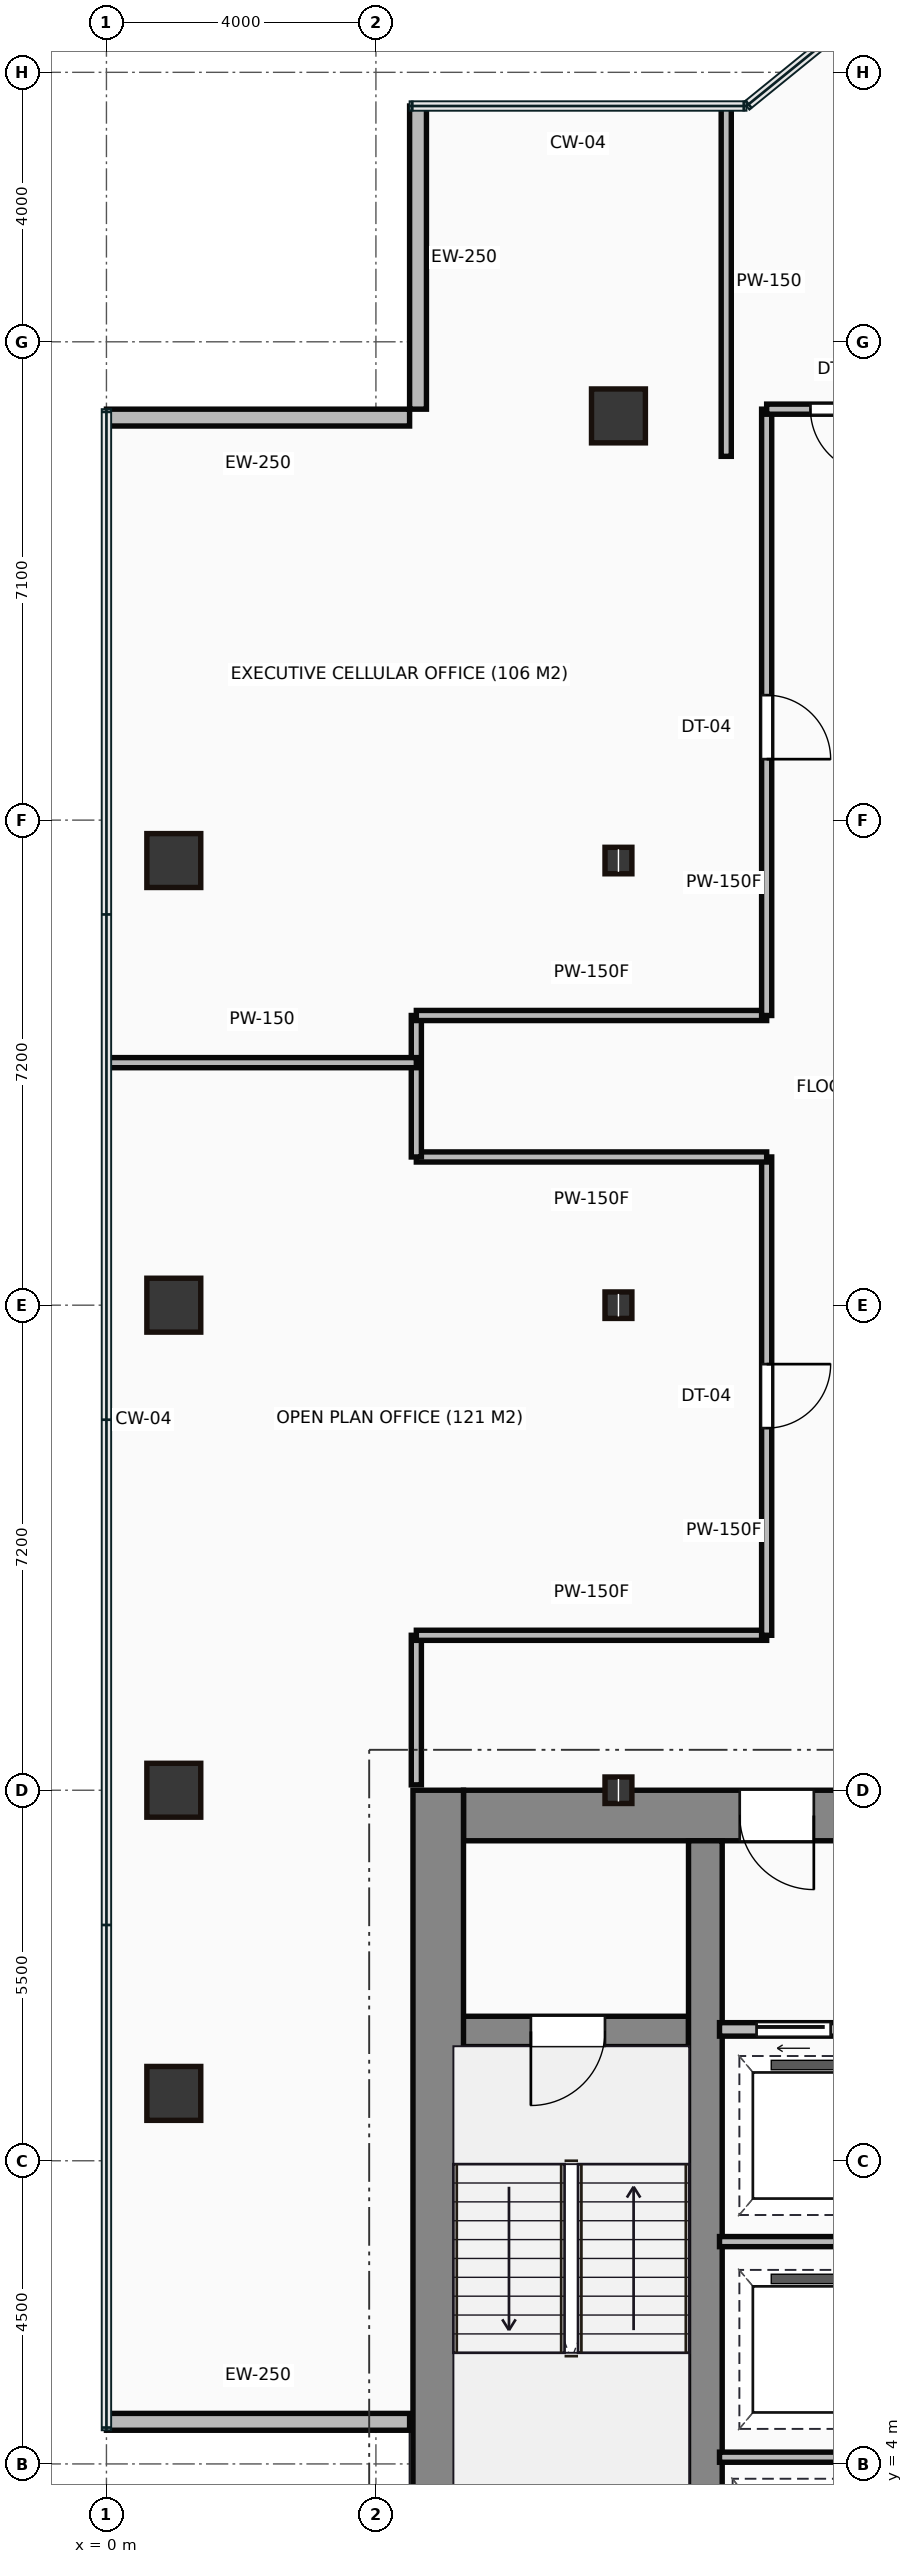
"""IFC4 building model, lengths in metres.
Left out: names, types, materials, properties, quantities, classifications, styles, units other than length and angle.
Written with IfcOpenShell. Run it as: python <this file> out.ifc"""

import sys

from ifc_helpers import new_model, si_unit, direction, frame, frame_2d, origin, origin_2d, place, context, subcontext, project, spatial, rectangle, hollow_rectangle, i_section, extrude, source, transform, mapped, element, fill, save


model = new_model("IFC4")
c1 = context("Model", 3, precision=1e-05, world=origin(), true_north=direction((0.0, 1.0)))
c2 = subcontext(c1, "Body", "Model", "MODEL_VIEW")
j1 = project(units=[si_unit("LENGTHUNIT", "METRE"), si_unit("PLANEANGLEUNIT", "RADIAN")], contexts=[c1])
p1 = place(None, origin())
s1 = spatial("IfcSite", under=j1, at=p1, CompositionType="ELEMENT")
p2 = place(p1, origin())
s2 = spatial("IfcBuilding", under=s1, at=p2, CompositionType="ELEMENT")
p3 = place(p2, frame((0.0, 0.0, 106.9)))
s3 = spatial("IfcBuildingStorey", under=s2, at=p3, CompositionType="ELEMENT", Elevation=106.9)
m1 = source(origin(), c2, "Body", "SweptSolid", [
    extrude(rectangle(XDim=13.1, YDim=0.75, at=frame_2d((6.55, 0.0))), origin(), (0.0, 0.0, 1.0), 3.65),
])
p4 = place(p3, frame((4.925, 0.9, 0.0), z_axis=(0.0, 0.0, 1.0), x_axis=(0.0, 1.0, 0.0)))
e1 = element("IfcWall", 1, at=p4, inside=s3, PredefinedType="SHEAR", context=c2, shape_type="MappedRepresentation", body=[
    mapped(m1, transform((0.0, 0.0, 0.0))),
])
m2 = source(origin(), c2, "Body", "SweptSolid", [
    extrude(rectangle(XDim=9.1, YDim=0.75, at=frame_2d((4.55, 0.0))), origin(), (0.0, 0.0, 1.0), 3.65),
])
p5 = place(p3, frame((5.3, 13.625, 0.0), z_axis=(0.0, 0.0, 1.0), x_axis=(1.0, 0.0, 0.0)))
e2 = element("IfcWall", 2, at=p5, inside=s3, PredefinedType="SHEAR", context=c2, shape_type="MappedRepresentation", body=[
    mapped(m2, transform((0.0, 0.0, 0.0))),
])
p6 = place(p5, frame((4.1, 0.0, 0.0)))
e3 = element("IfcOpeningElement", 3, at=p6, cuts=e2, PredefinedType="OPENING", context=c2, shape_type="SweptSolid", body=[
    extrude(rectangle(XDim=1.1, YDim=2.15, at=frame_2d((0.55, 1.075))), frame((0.0, 0.385, 0.0), z_axis=(0.0, -1.0, 0.0), x_axis=(1.0, 0.0, 0.0)), (0.0, 0.0, 1.0), 0.77),
])
m3 = source(origin(), c2, "Body", "SweptSolid", [
    extrude(rectangle(XDim=12.35, YDim=0.5, at=frame_2d((6.175, 0.0))), origin(), (0.0, 0.0, 1.0), 3.65),
])
p7 = place(p3, frame((8.89, 0.9, 0.0), z_axis=(0.0, 0.0, 1.0), x_axis=(0.0, 1.0, 0.0)))
e4 = element("IfcWall", 4, at=p7, inside=s3, PredefinedType="SHEAR", context=c2, shape_type="MappedRepresentation", body=[
    mapped(m3, transform((0.0, 0.0, 0.0))),
])
m4 = source(origin(), c2, "Body", "SweptSolid", [
    extrude(rectangle(XDim=3.39, YDim=0.45, at=frame_2d((1.695, 0.0))), origin(), (0.0, 0.0, 1.0), 3.65),
])
p8 = place(p3, frame((5.25, 10.42, 0.0), z_axis=(0.0, 0.0, 1.0), x_axis=(1.0, 0.0, 0.0)))
e5 = element("IfcWall", 5, at=p8, inside=s3, PredefinedType="SHEAR", context=c2, shape_type="MappedRepresentation", body=[
    mapped(m4, transform((0.0, 0.0, 0.0))),
])
p9 = place(p8, frame((1.05, 0.0, 0.0)))
e6 = element("IfcOpeningElement", 6, at=p9, cuts=e5, PredefinedType="OPENING", context=c2, shape_type="SweptSolid", body=[
    extrude(rectangle(XDim=1.1, YDim=2.15, at=frame_2d((0.55, 1.075))), frame((0.0, 0.235, 0.0), z_axis=(0.0, -1.0, 0.0), x_axis=(1.0, 0.0, 0.0)), (0.0, 0.0, 1.0), 0.47),
])
m5 = source(origin(), c2, "Body", "SweptSolid", [
    extrude(hollow_rectangle(XDim=0.8, YDim=0.8, WallThickness=0.04, at=origin_2d()), origin(), (0.0, 0.0, 1.0), 3.65),
])
for number, where, z_axis, x_axis in (
    (7, (1.0, 9.5, 0.0), (0.0, 0.0, 1.0), (1.0, 0.0, 0.0)),
    (8, (1.0, 14.0, 0.0), (0.0, 0.0, 1.0), (1.0, 0.0, 0.0)),
    (9, (1.0, 21.2, 0.0), (0.0, 0.0, 1.0), (1.0, 0.0, 0.0)),
    (10, (1.0, 27.8, 0.0), (0.0, 0.0, 1.0), (1.0, 0.0, 0.0)),
):
    element("IfcColumn", number, at=place(p3, frame(where, z_axis=z_axis, x_axis=x_axis)), inside=s3, PredefinedType="COLUMN", context=c2, shape_type="MappedRepresentation", body=[
        mapped(m5, transform((0.0, 0.0, 0.0))),
    ])
m6 = source(origin(), c2, "Body", "SweptSolid", [
    extrude(i_section(OverallWidth=0.399, OverallDepth=0.393, WebThickness=0.023, FlangeThickness=0.037, at=origin_2d()), origin(), (0.0, 0.0, 1.0), 3.65),
])
for number, where, z_axis, x_axis in (
    (11, (7.6, 14.0, 0.0), (0.0, 0.0, 1.0), (1.0, 0.0, 0.0)),
    (12, (7.6, 21.2, 0.0), (0.0, 0.0, 1.0), (1.0, 0.0, 0.0)),
    (13, (7.6, 27.8, 0.0), (0.0, 0.0, 1.0), (1.0, 0.0, 0.0)),
):
    element("IfcColumn", number, at=place(p3, frame(where, z_axis=z_axis, x_axis=x_axis)), inside=s3, PredefinedType="COLUMN", context=c2, shape_type="MappedRepresentation", body=[
        mapped(m6, transform((0.0, 0.0, 0.0))),
    ])
p10 = place(p3, frame((7.6, 34.4, 0.0), z_axis=(0.0, 0.0, 1.0), x_axis=(1.0, 0.0, 0.0)))
e14 = element("IfcColumn", 14, at=p10, inside=s3, PredefinedType="COLUMN", context=c2, shape_type="MappedRepresentation", body=[
    mapped(m5, transform((0.0, 0.0, 0.0))),
])
m7 = source(origin(), c2, "Body", "SweptSolid", [
    extrude(rectangle(XDim=4.5, YDim=0.25, at=frame_2d((2.25, 0.0))), origin(), (0.0, 0.0, 1.0), 3.4),
])
for number, where, z_axis, x_axis in (
    (15, (4.625, 39.0, 0.0), (0.0, 0.0, 1.0), (0.0, -1.0, 0.0)),
    (16, (4.5, 34.375, 0.0), (0.0, 0.0, 1.0), (-1.0, 0.0, 0.0)),
    (17, (0.0, 4.625, 0.0), (0.0, 0.0, 1.0), (1.0, 0.0, 0.0)),
):
    element("IfcWall", number, at=place(p3, frame(where, z_axis=z_axis, x_axis=x_axis)), inside=s3, PredefinedType="STANDARD", context=c2, shape_type="MappedRepresentation", body=[
        mapped(m7, transform((0.0, 0.0, 0.0))),
    ])
m8 = source(origin(), c2, "Body", "SweptSolid", [
    extrude(rectangle(XDim=2.35, YDim=0.2, at=frame_2d((1.175, 0.0))), origin(), (0.0, 0.0, 1.0), 3.4),
])
p11 = place(p3, frame((9.1, 10.45, 0.0), z_axis=(0.0, 0.0, 1.0), x_axis=(1.0, 0.0, 0.0)))
e18 = element("IfcWall", 18, at=p11, inside=s3, PredefinedType="PARTITIONING", context=c2, shape_type="MappedRepresentation", body=[
    mapped(m8, transform((0.0, 0.0, 0.0))),
])
p12 = place(p11, frame((0.55, 0.0, 0.0)))
e19 = element("IfcOpeningElement", 19, at=p12, cuts=e18, PredefinedType="OPENING", context=c2, shape_type="SweptSolid", body=[
    extrude(rectangle(XDim=1.1, YDim=2.15, at=frame_2d((0.55, 1.075))), frame((0.0, 0.11, 0.0), z_axis=(0.0, -1.0, 0.0), x_axis=(1.0, 0.0, 0.0)), (0.0, 0.0, 1.0), 0.22),
])
m9 = source(origin(), c2, "Body", "SweptSolid", [
    extrude(rectangle(XDim=2.4, YDim=0.15, at=frame_2d((1.2, 0.0))), origin(), (0.0, 0.0, 1.0), 3.4),
])
for number, where, z_axis, x_axis in (
    (20, (9.1, 4.1, 0.0), (0.0, 0.0, 1.0), (1.0, 0.0, 0.0)),
    (21, (9.1, 7.3, 0.0), (0.0, 0.0, 1.0), (1.0, 0.0, 0.0)),
):
    element("IfcWall", number, at=place(p3, frame(where, z_axis=z_axis, x_axis=x_axis)), inside=s3, PredefinedType="PARTITIONING", context=c2, shape_type="MappedRepresentation", body=[
        mapped(m9, transform((0.0, 0.0, 0.0))),
    ])
m10 = source(origin(), c2, "Body", "SweptSolid", [
    extrude(rectangle(XDim=2.22, YDim=0.15, at=frame_2d((1.11, 0.0))), origin(), (0.0, 0.0, 1.0), 3.4),
])
p13 = place(p3, frame((4.6, 14.08, 0.0), z_axis=(0.0, 0.0, 1.0), x_axis=(0.0, 1.0, 0.0)))
e22 = element("IfcWall", 22, at=p13, inside=s3, PredefinedType="PARTITIONING", context=c2, shape_type="MappedRepresentation", body=[
    mapped(m10, transform((0.0, 0.0, 0.0))),
])
m11 = source(origin(), c2, "Body", "SweptSolid", [
    extrude(rectangle(XDim=5.2, YDim=0.15, at=frame_2d((2.6, 0.0))), origin(), (0.0, 0.0, 1.0), 3.4),
])
p14 = place(p3, frame((4.6, 16.3, 0.0), z_axis=(0.0, 0.0, 1.0), x_axis=(1.0, 0.0, 0.0)))
e23 = element("IfcWall", 23, at=p14, inside=s3, PredefinedType="PARTITIONING", context=c2, shape_type="MappedRepresentation", body=[
    mapped(m11, transform((0.0, 0.0, 0.0))),
])
m12 = source(origin(), c2, "Body", "SweptSolid", [
    extrude(rectangle(XDim=7.1, YDim=0.15, at=frame_2d((3.55, 0.0))), origin(), (0.0, 0.0, 1.0), 3.4),
])
p15 = place(p3, frame((9.8, 16.3, 0.0), z_axis=(0.0, 0.0, 1.0), x_axis=(0.0, 1.0, 0.0)))
e24 = element("IfcWall", 24, at=p15, inside=s3, PredefinedType="PARTITIONING", context=c2, shape_type="MappedRepresentation", body=[
    mapped(m12, transform((0.0, 0.0, 0.0))),
])
p16 = place(p15, frame((3.075, 0.0, 0.0)))
e25 = element("IfcOpeningElement", 25, at=p16, cuts=e24, PredefinedType="OPENING", context=c2, shape_type="SweptSolid", body=[
    extrude(rectangle(XDim=0.95, YDim=2.15, at=frame_2d((0.475, 1.075))), frame((0.0, 0.085, 0.0), z_axis=(0.0, -1.0, 0.0), x_axis=(1.0, 0.0, 0.0)), (0.0, 0.0, 1.0), 0.17),
])
m13 = source(origin(), c2, "Body", "SweptSolid", [
    extrude(rectangle(XDim=5.2, YDim=0.15, at=frame_2d((2.6, 0.0))), origin(), (0.0, 0.0, 1.0), 2.988),
])
p17 = place(p3, frame((9.8, 23.4, 0.0), z_axis=(0.0, 0.0, 1.0), x_axis=(-1.0, 0.0, 0.0)))
e26 = element("IfcWall", 26, at=p17, inside=s3, PredefinedType="PARTITIONING", context=c2, shape_type="MappedRepresentation", body=[
    mapped(m13, transform((0.0, 0.0, 0.0))),
])
m14 = source(origin(), c2, "Body", "SweptSolid", [
    extrude(rectangle(XDim=2.1, YDim=0.15, at=frame_2d((1.05, 0.0))), origin(), (0.0, 0.0, 1.0), 3.4),
])
p18 = place(p3, frame((4.6, 23.4, 0.0), z_axis=(0.0, 0.0, 1.0), x_axis=(0.0, 1.0, 0.0)))
e27 = element("IfcWall", 27, at=p18, inside=s3, PredefinedType="PARTITIONING", context=c2, shape_type="MappedRepresentation", body=[
    mapped(m14, transform((0.0, 0.0, 0.0))),
])
p19 = place(p3, frame((4.6, 25.5, 0.0), z_axis=(0.0, 0.0, 1.0), x_axis=(1.0, 0.0, 0.0)))
e28 = element("IfcWall", 28, at=p19, inside=s3, PredefinedType="PARTITIONING", context=c2, shape_type="MappedRepresentation", body=[
    mapped(m13, transform((0.0, 0.0, 0.0))),
])
m15 = source(origin(), c2, "Body", "SweptSolid", [
    extrude(rectangle(XDim=9.0, YDim=0.15, at=frame_2d((4.5, 0.0))), origin(), (0.0, 0.0, 1.0), 3.4),
])
p20 = place(p3, frame((9.8, 25.5, 0.0), z_axis=(0.0, 0.0, 1.0), x_axis=(0.0, 1.0, 0.0)))
e29 = element("IfcWall", 29, at=p20, inside=s3, PredefinedType="PARTITIONING", context=c2, shape_type="MappedRepresentation", body=[
    mapped(m15, transform((0.0, 0.0, 0.0))),
])
p21 = place(p20, frame((3.805, 0.0, 0.0)))
e30 = element("IfcOpeningElement", 30, at=p21, cuts=e29, PredefinedType="OPENING", context=c2, shape_type="SweptSolid", body=[
    extrude(rectangle(XDim=0.95, YDim=2.15, at=frame_2d((0.475, 1.075))), frame((0.0, 0.085, 0.0), z_axis=(0.0, -1.0, 0.0), x_axis=(1.0, 0.0, 0.0)), (0.0, 0.0, 1.0), 0.17),
])
m16 = source(origin(), c2, "Body", "SweptSolid", [
    extrude(rectangle(XDim=2.25, YDim=0.15, at=frame_2d((1.125, 0.0))), origin(), (0.0, 0.0, 1.0), 2.702),
])
p22 = place(p3, frame((9.8, 34.5, 0.0), z_axis=(0.0, 0.0, 1.0), x_axis=(1.0, 0.0, 0.0)))
e31 = element("IfcWall", 31, at=p22, inside=s3, PredefinedType="PARTITIONING", context=c2, shape_type="MappedRepresentation", body=[
    mapped(m16, transform((0.0, 0.0, 0.0))),
])
p23 = place(p22, frame((0.65, 0.0, 0.0)))
e32 = element("IfcOpeningElement", 32, at=p23, cuts=e31, PredefinedType="OPENING", context=c2, shape_type="SweptSolid", body=[
    extrude(rectangle(XDim=0.95, YDim=2.15, at=frame_2d((0.475, 1.075))), frame((0.0, 0.085, 0.0), z_axis=(0.0, -1.0, 0.0), x_axis=(1.0, 0.0, 0.0)), (0.0, 0.0, 1.0), 0.17),
])
m17 = source(origin(), c2, "Body", "SweptSolid", [
    extrude(rectangle(XDim=4.58, YDim=0.15, at=frame_2d((2.29, 0.0))), origin(), (0.0, 0.0, 1.0), 3.4),
])
p24 = place(p3, frame((0.02, 24.8, 0.0), z_axis=(0.0, 0.0, 1.0), x_axis=(1.0, 0.0, 0.0)))
e33 = element("IfcWall", 33, at=p24, inside=s3, PredefinedType="PARTITIONING", context=c2, shape_type="MappedRepresentation", body=[
    mapped(m17, transform((0.0, 0.0, 0.0))),
])
m18 = source(origin(), c2, "Body", "SweptSolid", [
    extrude(rectangle(XDim=5.18, YDim=0.15, at=frame_2d((2.59, 0.0))), origin(), (0.0, 0.0, 1.0), 3.4),
])
p25 = place(p3, frame((9.2, 38.98, 0.0), z_axis=(0.0, 0.0, 1.0), x_axis=(0.0, -1.0, 0.0)))
e34 = element("IfcWall", 34, at=p25, inside=s3, PredefinedType="PARTITIONING", context=c2, shape_type="MappedRepresentation", body=[
    mapped(m18, transform((0.0, 0.0, 0.0))),
])
m19 = source(origin(), c2, "Body", "SweptSolid", [
    extrude(rectangle(XDim=1.1, YDim=2.15, at=frame_2d((0.55, 1.075))), frame((0.0, 0.025, 0.0), z_axis=(0.0, -1.0, 0.0), x_axis=(1.0, 0.0, 0.0)), (0.0, 0.0, 1.0), 0.05),
])
p26 = place(p9, frame((1.1, 0.0, 0.0), z_axis=(0.0, 0.0, 1.0), x_axis=(-1.0, 0.0, 0.0)))
e35 = element("IfcDoor", 35, at=p26, inside=s3, OperationType="SINGLE_SWING_LEFT", PredefinedType="DOOR", context=c2, shape_type="MappedRepresentation", body=[
    mapped(m19, transform((0.0, 0.0, 0.0))),
])
fill(e6, e35)
p27 = place(p6, origin())
e36 = element("IfcDoor", 36, at=p27, inside=s3, OperationType="SINGLE_SWING_RIGHT", PredefinedType="DOOR", context=c2, shape_type="MappedRepresentation", body=[
    mapped(m19, transform((0.0, 0.0, 0.0))),
])
fill(e3, e36)
p28 = place(p12, origin())
e37 = element("IfcDoor", 37, at=p28, inside=s3, OperationType="SLIDING_TO_LEFT", PredefinedType="DOOR", context=c2, shape_type="MappedRepresentation", body=[
    mapped(m19, transform((0.0, 0.0, 0.0))),
])
fill(e19, e37)
m20 = source(origin(), c2, "Body", "SweptSolid", [
    extrude(rectangle(XDim=0.95, YDim=2.15, at=frame_2d((0.475, 1.075))), frame((0.0, 0.025, 0.0), z_axis=(0.0, -1.0, 0.0), x_axis=(1.0, 0.0, 0.0)), (0.0, 0.0, 1.0), 0.05),
])
p29 = place(p16, origin())
e38 = element("IfcDoor", 38, at=p29, inside=s3, OperationType="SINGLE_SWING_RIGHT", PredefinedType="DOOR", context=c2, shape_type="MappedRepresentation", body=[
    mapped(m20, transform((0.0, 0.0, 0.0))),
])
fill(e25, e38)
p30 = place(p21, origin())
e39 = element("IfcDoor", 39, at=p30, inside=s3, OperationType="SINGLE_SWING_LEFT", PredefinedType="DOOR", context=c2, shape_type="MappedRepresentation", body=[
    mapped(m20, transform((0.0, 0.0, 0.0))),
])
fill(e30, e39)
p31 = place(p23, origin())
e40 = element("IfcDoor", 40, at=p31, inside=s3, OperationType="SINGLE_SWING_RIGHT", PredefinedType="DOOR", context=c2, shape_type="MappedRepresentation", body=[
    mapped(m20, transform((0.0, 0.0, 0.0))),
])
fill(e32, e40)
save(model, sys.argv[1])
